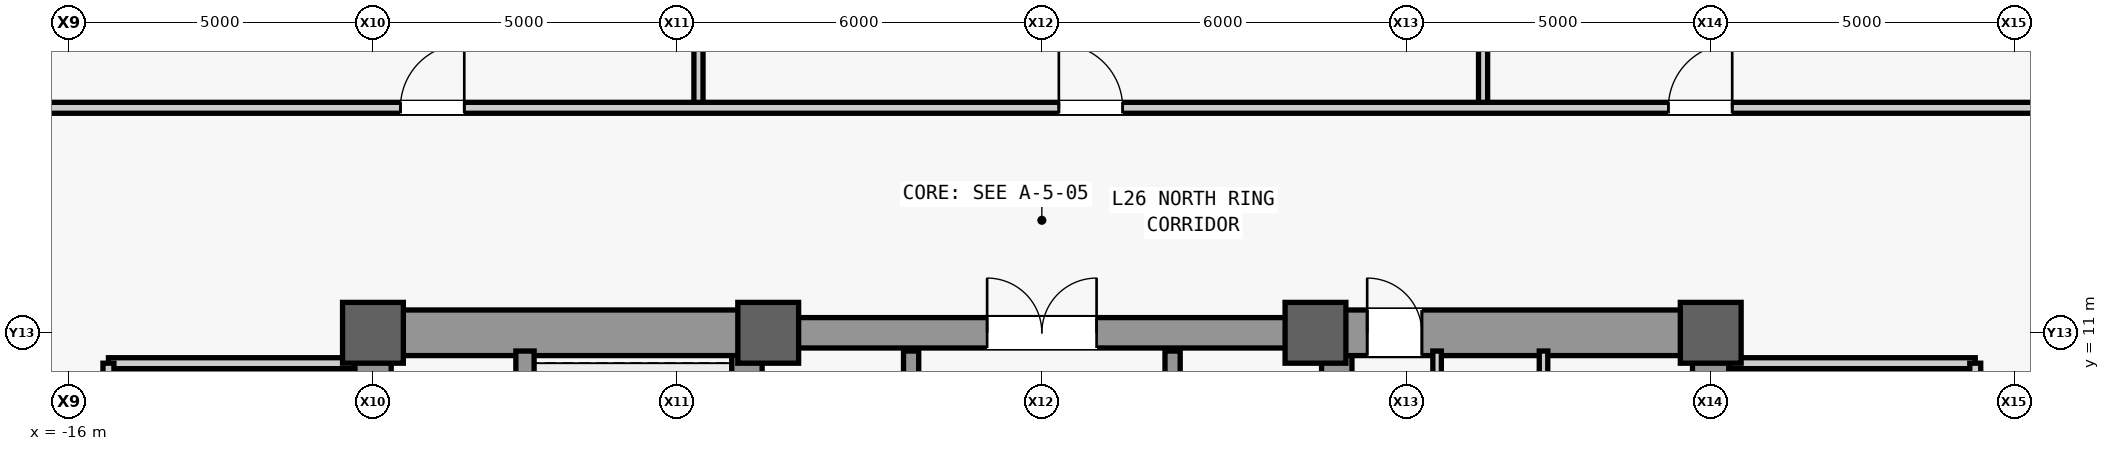
"""IFC4 building model, lengths in metres.
Left out: names, types, materials, properties, quantities, classifications, styles, units other than length and angle.
Written with IfcOpenShell. Run it as: python <this file> out.ifc"""

import sys

from ifc_helpers import new_model, si_unit, direction, frame, frame_2d, origin, origin_2d, place, context, subcontext, project, spatial, rectangle, extrude, source, transform, mapped, element, fill, save


model = new_model("IFC4")
c1 = context("Model", 3, precision=1e-05, world=origin(), true_north=direction((0.0, 1.0)))
c2 = subcontext(c1, "Body", "Model", "MODEL_VIEW")
j1 = project(units=[si_unit("LENGTHUNIT", "METRE"), si_unit("PLANEANGLEUNIT", "RADIAN")], contexts=[c1])
p1 = place(None, origin())
s1 = spatial("IfcSite", under=j1, at=p1, CompositionType="ELEMENT")
p2 = place(p1, origin())
s2 = spatial("IfcBuilding", under=s1, at=p2, CompositionType="ELEMENT")
p3 = place(p2, frame((0.0, 0.0, 116.0)))
s3 = spatial("IfcBuildingStorey", under=s2, at=p3, CompositionType="ELEMENT", Elevation=116.0)
m1 = source(origin(), c2, "Body", "SweptSolid", [
    extrude(rectangle(XDim=22.0, YDim=0.6, at=frame_2d((11.0, 0.0))), origin(), (0.0, 0.0, 1.0), 3.84),
])
p4 = place(p3, frame((-11.0, -11.0, 0.0), z_axis=(0.0, 0.0, 1.0), x_axis=(0.0, 1.0, 0.0)))
e1 = element("IfcWall", 1, at=p4, inside=s3, PredefinedType="SHEAR", context=c2, shape_type="MappedRepresentation", body=[
    mapped(m1, transform((0.0, 0.0, 0.0), scale=1.0)),
])
m2 = source(origin(), c2, "Body", "SweptSolid", [
    extrude(rectangle(XDim=1.1, YDim=2.2, at=frame_2d((0.55, 1.1))), frame((0.0, 0.31, 0.0), z_axis=(0.0, -1.0, 0.0), x_axis=(1.0, 0.0, 0.0)), (0.0, 0.0, 1.0), 0.62),
])
p5 = place(p4, frame((0.8, 0.0, 0.0)))
e2 = element("IfcOpeningElement", 2, at=p5, cuts=e1, PredefinedType="OPENING", context=c2, shape_type="MappedRepresentation", body=[
    mapped(m2, transform((0.0, 0.0, 0.0), scale=1.0)),
])
p6 = place(p4, frame((12.5, 0.0, 0.0)))
e3 = element("IfcOpeningElement", 3, at=p6, cuts=e1, PredefinedType="OPENING", context=c2, shape_type="MappedRepresentation", body=[
    mapped(m2, transform((0.0, 0.0, 0.0), scale=1.0)),
])
m3 = source(origin(), c2, "Body", "SweptSolid", [
    extrude(rectangle(XDim=0.9, YDim=2.15, at=frame_2d((0.45, 1.075))), frame((0.0, 0.31, 0.0), z_axis=(0.0, -1.0, 0.0), x_axis=(1.0, 0.0, 0.0)), (0.0, 0.0, 1.0), 0.62),
])
p7 = place(p4, frame((7.575, 0.0, 0.0)))
e4 = element("IfcOpeningElement", 4, at=p7, cuts=e1, PredefinedType="OPENING", context=c2, shape_type="MappedRepresentation", body=[
    mapped(m3, transform((0.0, 0.0, 0.0), scale=1.0)),
])
m4 = source(origin(), c2, "Body", "SweptSolid", [
    extrude(rectangle(XDim=1.3, YDim=2.3, at=frame_2d((0.65, 1.15))), frame((0.0, 0.31, 0.0), z_axis=(0.0, -1.0, 0.0), x_axis=(1.0, 0.0, 0.0)), (0.0, 0.0, 1.0), 0.62),
])
p8 = place(p4, frame((2.7, 0.0, 0.0)))
e5 = element("IfcOpeningElement", 5, at=p8, cuts=e1, PredefinedType="OPENING", context=c2, shape_type="MappedRepresentation", body=[
    mapped(m4, transform((0.0, 0.0, 0.0), scale=1.0)),
])
p9 = place(p3, frame((11.0, -11.0, 0.0), z_axis=(0.0, 0.0, 1.0), x_axis=(0.0, 1.0, 0.0)))
e6 = element("IfcWall", 6, at=p9, inside=s3, PredefinedType="SHEAR", context=c2, shape_type="MappedRepresentation", body=[
    mapped(m1, transform((0.0, 0.0, 0.0), scale=1.0)),
])
p10 = place(p9, frame((0.8, 0.0, 0.0)))
e7 = element("IfcOpeningElement", 7, at=p10, cuts=e6, PredefinedType="OPENING", context=c2, shape_type="MappedRepresentation", body=[
    mapped(m2, transform((0.0, 0.0, 0.0), scale=1.0)),
])
p11 = place(p9, frame((7.575, 0.0, 0.0)))
e8 = element("IfcOpeningElement", 8, at=p11, cuts=e6, PredefinedType="OPENING", context=c2, shape_type="MappedRepresentation", body=[
    mapped(m3, transform((0.0, 0.0, 0.0), scale=1.0)),
])
p12 = place(p9, frame((2.7, 0.0, 0.0)))
e9 = element("IfcOpeningElement", 9, at=p12, cuts=e6, PredefinedType="OPENING", context=c2, shape_type="MappedRepresentation", body=[
    mapped(m4, transform((0.0, 0.0, 0.0), scale=1.0)),
])
p13 = place(p9, frame((13.35, 0.0, 0.0)))
e10 = element("IfcOpeningElement", 10, at=p13, cuts=e6, PredefinedType="OPENING", context=c2, shape_type="MappedRepresentation", body=[
    mapped(m4, transform((0.0, 0.0, 0.0), scale=1.0)),
])
m5 = source(origin(), c2, "Body", "SweptSolid", [
    extrude(rectangle(XDim=21.4, YDim=0.5, at=frame_2d((10.7, 0.0))), origin(), (0.0, 0.0, 1.0), 3.84),
])
for number, where, z_axis, x_axis in (
    (11, (-4.85, -10.7, 0.0), (0.0, 0.0, 1.0), (0.0, 1.0, 0.0)),
    (12, (4.85, -10.7, 0.0), (0.0, 0.0, 1.0), (0.0, 1.0, 0.0)),
):
    element("IfcWall", number, at=place(p3, frame(where, z_axis=z_axis, x_axis=x_axis)), inside=s3, PredefinedType="SHEAR", context=c2, shape_type="MappedRepresentation", body=[
        mapped(m5, transform((0.0, 0.0, 0.0), scale=1.0)),
    ])
m6 = source(origin(), c2, "Body", "SweptSolid", [
    extrude(rectangle(XDim=5.85, YDim=0.75, at=frame_2d((2.925, 0.0))), origin(), (0.0, 0.0, 1.0), 3.84),
])
p14 = place(p3, frame((-10.7, 11.0, 0.0), z_axis=(0.0, 0.0, 1.0), x_axis=(1.0, 0.0, 0.0)))
e13 = element("IfcWall", 13, at=p14, inside=s3, PredefinedType="SHEAR", context=c2, shape_type="MappedRepresentation", body=[
    mapped(m6, transform((0.0, 0.0, 0.0), scale=1.0)),
])
p15 = place(p3, frame((4.85, 11.0, 0.0), z_axis=(0.0, 0.0, 1.0), x_axis=(1.0, 0.0, 0.0)))
e14 = element("IfcWall", 14, at=p15, inside=s3, PredefinedType="SHEAR", context=c2, shape_type="MappedRepresentation", body=[
    mapped(m6, transform((0.0, 0.0, 0.0), scale=1.0)),
])
m7 = source(origin(), c2, "Body", "SweptSolid", [
    extrude(rectangle(XDim=0.9, YDim=2.15, at=frame_2d((0.45, 1.075))), frame((0.0, 0.385, 0.0), z_axis=(0.0, -1.0, 0.0), x_axis=(1.0, 0.0, 0.0)), (0.0, 0.0, 1.0), 0.77),
])
p16 = place(p15, frame((0.5, 0.0, 0.0)))
e15 = element("IfcOpeningElement", 15, at=p16, cuts=e14, PredefinedType="OPENING", context=c2, shape_type="MappedRepresentation", body=[
    mapped(m7, transform((0.0, 0.0, 0.0), scale=1.0)),
])
m8 = source(origin(), c2, "Body", "SweptSolid", [
    extrude(rectangle(XDim=9.2, YDim=0.5, at=frame_2d((4.6, 0.0))), origin(), (0.0, 0.0, 1.0), 3.84),
])
p17 = place(p3, frame((-4.6, 11.0, 0.0), z_axis=(0.0, 0.0, 1.0), x_axis=(1.0, 0.0, 0.0)))
e16 = element("IfcWall", 16, at=p17, inside=s3, PredefinedType="SHEAR", context=c2, shape_type="MappedRepresentation", body=[
    mapped(m8, transform((0.0, 0.0, 0.0), scale=1.0)),
])
m9 = source(origin(), c2, "Body", "SweptSolid", [
    extrude(rectangle(XDim=1.8, YDim=2.25, at=frame_2d((0.9, 1.125))), frame((0.0, 0.26, 0.0), z_axis=(0.0, -1.0, 0.0), x_axis=(1.0, 0.0, 0.0)), (0.0, 0.0, 1.0), 0.52),
])
p18 = place(p17, frame((3.7, 0.0, 0.0)))
e17 = element("IfcOpeningElement", 17, at=p18, cuts=e16, PredefinedType="OPENING", context=c2, shape_type="MappedRepresentation", body=[
    mapped(m9, transform((0.0, 0.0, 0.0), scale=1.0)),
])
m10 = source(origin(), c2, "Body", "SweptSolid", [
    extrude(rectangle(XDim=1.0, YDim=1.0, at=origin_2d()), origin(), (0.0, 0.0, 1.0), 4.1),
])
for number, where, z_axis, x_axis in (
    (18, (-11.0, 11.0, 0.0), (0.0, 0.0, 1.0), (1.0, 0.0, 0.0)),
    (19, (-4.5, 11.0, 0.0), (0.0, 0.0, 1.0), (1.0, 0.0, 0.0)),
    (20, (4.5, 11.0, 0.0), (0.0, 0.0, 1.0), (1.0, 0.0, 0.0)),
    (21, (11.0, 11.0, 0.0), (0.0, 0.0, 1.0), (1.0, 0.0, 0.0)),
):
    element("IfcColumn", number, at=place(p3, frame(where, z_axis=z_axis, x_axis=x_axis)), inside=s3, PredefinedType="COLUMN", context=c2, shape_type="MappedRepresentation", body=[
        mapped(m10, transform((0.0, 0.0, 0.0), scale=1.0)),
    ])
m11 = source(origin(), c2, "Body", "SweptSolid", [
    extrude(rectangle(XDim=7.75, YDim=0.3, at=frame_2d((3.875, 0.0))), origin(), (0.0, 0.0, 1.0), 3.84),
])
p19 = place(p3, frame((-8.5, 2.95, 0.0), z_axis=(0.0, 0.0, 1.0), x_axis=(0.0, 1.0, 0.0)))
e22 = element("IfcWall", 22, at=p19, inside=s3, PredefinedType="SHEAR", context=c2, shape_type="MappedRepresentation", body=[
    mapped(m11, transform((0.0, 0.0, 0.0), scale=1.0)),
])
m12 = source(origin(), c2, "Body", "SweptSolid", [
    extrude(rectangle(XDim=9.4, YDim=0.14, at=frame_2d((4.7, 0.0))), origin(), (0.0, 0.0, 1.0), 3.84),
])
p20 = place(p3, frame((8.25, 1.3, 0.0), z_axis=(0.0, 0.0, 1.0), x_axis=(0.0, 1.0, 0.0)))
e23 = element("IfcWall", 23, at=p20, inside=s3, PredefinedType="PARTITIONING", context=c2, shape_type="MappedRepresentation", body=[
    mapped(m12, transform((0.0, 0.0, 0.0), scale=1.0)),
])
m13 = source(origin(), c2, "Body", "SweptSolid", [
    extrude(rectangle(XDim=5.7, YDim=0.14, at=frame_2d((2.85, 0.0))), origin(), (0.0, 0.0, 1.0), 3.84),
])
p21 = place(p3, frame((6.5, 5.0, 0.0), z_axis=(0.0, 0.0, 1.0), x_axis=(0.0, 1.0, 0.0)))
e24 = element("IfcWall", 24, at=p21, inside=s3, PredefinedType="PARTITIONING", context=c2, shape_type="MappedRepresentation", body=[
    mapped(m13, transform((0.0, 0.0, 0.0), scale=1.0)),
])
m14 = source(origin(), c2, "Body", "SweptSolid", [
    extrude(rectangle(XDim=0.9, YDim=2.15, at=frame_2d((0.45, 1.075))), frame((0.0, 0.08, 0.0), z_axis=(0.0, -1.0, 0.0), x_axis=(1.0, 0.0, 0.0)), (0.0, 0.0, 1.0), 0.16),
])
p22 = place(p21, frame((2.05, 0.0, 0.0)))
e25 = element("IfcOpeningElement", 25, at=p22, cuts=e24, PredefinedType="OPENING", context=c2, shape_type="MappedRepresentation", body=[
    mapped(m14, transform((0.0, 0.0, 0.0), scale=1.0)),
])
m15 = source(origin(), c2, "Body", "SweptSolid", [
    extrude(rectangle(XDim=4.05, YDim=0.18, at=frame_2d((2.025, 0.0))), origin(), (0.0, 0.0, 1.0), 3.84),
])
p23 = place(p3, frame((-15.35, 10.5, 0.0), z_axis=(0.0, 0.0, 1.0), x_axis=(1.0, 0.0, 0.0)))
e26 = element("IfcWall", 26, at=p23, inside=s3, PredefinedType="PARTITIONING", context=c2, shape_type="MappedRepresentation", body=[
    mapped(m15, transform((0.0, 0.0, 0.0), scale=1.0)),
])
m16 = source(origin(), c2, "Body", "SweptSolid", [
    extrude(rectangle(XDim=16.6, YDim=0.18, at=frame_2d((8.3, 0.0))), origin(), (0.0, 0.0, 1.0), 3.84),
])
p24 = place(p3, frame((-15.35, -6.1, 0.0), z_axis=(0.0, 0.0, 1.0), x_axis=(0.0, 1.0, 0.0)))
e27 = element("IfcWall", 27, at=p24, inside=s3, PredefinedType="PARTITIONING", context=c2, shape_type="MappedRepresentation", body=[
    mapped(m16, transform((0.0, 0.0, 0.0), scale=1.0)),
])
m17 = source(origin(), c2, "Body", "SweptSolid", [
    extrude(rectangle(XDim=1.8, YDim=2.25, at=frame_2d((0.9, 1.125))), frame((0.0, 0.1, 0.0), z_axis=(0.0, -1.0, 0.0), x_axis=(1.0, 0.0, 0.0)), (0.0, 0.0, 1.0), 0.2),
])
p25 = place(p24, frame((2.7, 0.0, 0.0)))
e28 = element("IfcOpeningElement", 28, at=p25, cuts=e27, PredefinedType="OPENING", context=c2, shape_type="MappedRepresentation", body=[
    mapped(m17, transform((0.0, 0.0, 0.0), scale=1.0)),
])
p26 = place(p24, frame((11.0, 0.0, 0.0)))
e29 = element("IfcOpeningElement", 29, at=p26, cuts=e27, PredefinedType="OPENING", context=c2, shape_type="MappedRepresentation", body=[
    mapped(m17, transform((0.0, 0.0, 0.0), scale=1.0)),
])
p27 = place(p3, frame((11.3, 10.5, 0.0), z_axis=(0.0, 0.0, 1.0), x_axis=(1.0, 0.0, 0.0)))
e30 = element("IfcWall", 30, at=p27, inside=s3, PredefinedType="PARTITIONING", context=c2, shape_type="MappedRepresentation", body=[
    mapped(m15, transform((0.0, 0.0, 0.0), scale=1.0)),
])
p28 = place(p3, frame((15.35, -6.1, 0.0), z_axis=(0.0, 0.0, 1.0), x_axis=(0.0, 1.0, 0.0)))
e31 = element("IfcWall", 31, at=p28, inside=s3, PredefinedType="PARTITIONING", context=c2, shape_type="MappedRepresentation", body=[
    mapped(m16, transform((0.0, 0.0, 0.0), scale=1.0)),
])
p29 = place(p28, frame((2.7, 0.0, 0.0)))
e32 = element("IfcOpeningElement", 32, at=p29, cuts=e31, PredefinedType="OPENING", context=c2, shape_type="MappedRepresentation", body=[
    mapped(m17, transform((0.0, 0.0, 0.0), scale=1.0)),
])
p30 = place(p28, frame((13.0, 0.0, 0.0)))
e33 = element("IfcOpeningElement", 33, at=p30, cuts=e31, PredefinedType="OPENING", context=c2, shape_type="MappedRepresentation", body=[
    mapped(m17, transform((0.0, 0.0, 0.0), scale=1.0)),
])
m18 = source(origin(), c2, "Body", "SweptSolid", [
    extrude(rectangle(XDim=5.4, YDim=0.25, at=frame_2d((2.7, 0.0))), origin(), (0.0, 0.0, 1.0), 3.84),
])
for number, where, z_axis, x_axis in (
    (34, (-2.15, 5.3, 0.0), (0.0, 0.0, 1.0), (0.0, 1.0, 0.0)),
    (35, (2.15, 5.3, 0.0), (0.0, 0.0, 1.0), (0.0, 1.0, 0.0)),
):
    element("IfcWall", number, at=place(p3, frame(where, z_axis=z_axis, x_axis=x_axis)), inside=s3, PredefinedType="SHEAR", context=c2, shape_type="MappedRepresentation", body=[
        mapped(m18, transform((0.0, 0.0, 0.0), scale=1.0)),
    ])
m19 = source(origin(), c2, "Body", "SweptSolid", [
    extrude(rectangle(XDim=17.3, YDim=0.15, at=frame_2d((8.65, 0.0))), origin(), (0.0, 0.0, 1.0), 3.84),
])
for number, where, z_axis, x_axis in (
    (36, (-5.647, 14.7, 0.0), (0.0, 0.0, 1.0), (0.0, 1.0, 0.0)),
    (37, (7.256, 14.7, 0.0), (0.0, 0.0, 1.0), (0.0, 1.0, 0.0)),
):
    element("IfcWall", number, at=place(p3, frame(where, z_axis=z_axis, x_axis=x_axis)), inside=s3, PredefinedType="PARTITIONING", context=c2, shape_type="MappedRepresentation", body=[
        mapped(m19, transform((0.0, 0.0, 0.0), scale=1.0)),
    ])
m20 = source(origin(), c2, "Body", "SweptSolid", [
    extrude(rectangle(XDim=37.95, YDim=0.18, at=frame_2d((18.975, 0.0))), origin(), (0.0, 0.0, 1.0), 3.84),
])
p31 = place(p3, frame((-18.55, 14.7, 0.0), z_axis=(0.0, 0.0, 1.0), x_axis=(1.0, 0.0, 0.0)))
e38 = element("IfcWall", 38, at=p31, inside=s3, PredefinedType="PARTITIONING", context=c2, shape_type="MappedRepresentation", body=[
    mapped(m20, transform((0.0, 0.0, 0.0), scale=1.0)),
])
m21 = source(origin(), c2, "Body", "SweptSolid", [
    extrude(rectangle(XDim=1.05, YDim=2.2, at=frame_2d((0.525, 1.1))), frame((0.0, 0.1, 0.0), z_axis=(0.0, -1.0, 0.0), x_axis=(1.0, 0.0, 0.0)), (0.0, 0.0, 1.0), 0.2),
])
p32 = place(p31, frame((8.001, 0.0, 0.0)))
e39 = element("IfcOpeningElement", 39, at=p32, cuts=e38, PredefinedType="OPENING", context=c2, shape_type="MappedRepresentation", body=[
    mapped(m21, transform((0.0, 0.0, 0.0), scale=1.0)),
])
p33 = place(p31, frame((18.83, 0.0, 0.0)))
e40 = element("IfcOpeningElement", 40, at=p33, cuts=e38, PredefinedType="OPENING", context=c2, shape_type="MappedRepresentation", body=[
    mapped(m21, transform((0.0, 0.0, 0.0), scale=1.0)),
])
p34 = place(p31, frame((28.853, 0.0, 0.0)))
e41 = element("IfcOpeningElement", 41, at=p34, cuts=e38, PredefinedType="OPENING", context=c2, shape_type="MappedRepresentation", body=[
    mapped(m21, transform((0.0, 0.0, 0.0), scale=1.0)),
])
m22 = source(origin(), c2, "Body", "SweptSolid", [
    extrude(rectangle(XDim=0.9, YDim=2.15, at=frame_2d((0.45, 1.075))), frame((0.0, 0.025, 0.0), z_axis=(0.0, -1.0, 0.0), x_axis=(1.0, 0.0, 0.0)), (0.0, 0.0, 1.0), 0.05),
])
p35 = place(p16, origin())
e42 = element("IfcDoor", 42, at=p35, inside=s3, OperationType="SINGLE_SWING_LEFT", PredefinedType="DOOR", context=c2, shape_type="MappedRepresentation", body=[
    mapped(m22, transform((0.0, 0.0, 0.0), scale=1.0)),
])
fill(e15, e42)
m23 = source(origin(), c2, "Body", "SweptSolid", [
    extrude(rectangle(XDim=1.8, YDim=2.25, at=frame_2d((0.9, 1.125))), frame((0.0, 0.025, 0.0), z_axis=(0.0, -1.0, 0.0), x_axis=(1.0, 0.0, 0.0)), (0.0, 0.0, 1.0), 0.05),
])
p36 = place(p18, origin())
e43 = element("IfcDoor", 43, at=p36, inside=s3, OperationType="SINGLE_SWING_RIGHT", PredefinedType="DOOR", context=c2, shape_type="MappedRepresentation", body=[
    mapped(m23, transform((0.0, 0.0, 0.0), scale=1.0)),
])
fill(e17, e43)
m24 = source(origin(), c2, "Body", "SweptSolid", [
    extrude(rectangle(XDim=1.05, YDim=2.2, at=frame_2d((0.525, 1.1))), frame((0.0, 0.025, 0.0), z_axis=(0.0, -1.0, 0.0), x_axis=(1.0, 0.0, 0.0)), (0.0, 0.0, 1.0), 0.05),
])
p37 = place(p32, origin())
e44 = element("IfcDoor", 44, at=p37, inside=s3, OperationType="SINGLE_SWING_RIGHT", PredefinedType="DOOR", context=c2, shape_type="MappedRepresentation", body=[
    mapped(m24, transform((0.0, 0.0, 0.0), scale=1.0)),
])
fill(e39, e44)
p38 = place(p33, origin())
e45 = element("IfcDoor", 45, at=p38, inside=s3, OperationType="SINGLE_SWING_LEFT", PredefinedType="DOOR", context=c2, shape_type="MappedRepresentation", body=[
    mapped(m24, transform((0.0, 0.0, 0.0), scale=1.0)),
])
fill(e40, e45)
p39 = place(p34, origin())
e46 = element("IfcDoor", 46, at=p39, inside=s3, OperationType="SINGLE_SWING_RIGHT", PredefinedType="DOOR", context=c2, shape_type="MappedRepresentation", body=[
    mapped(m24, transform((0.0, 0.0, 0.0), scale=1.0)),
])
fill(e41, e46)
save(model, sys.argv[1])
